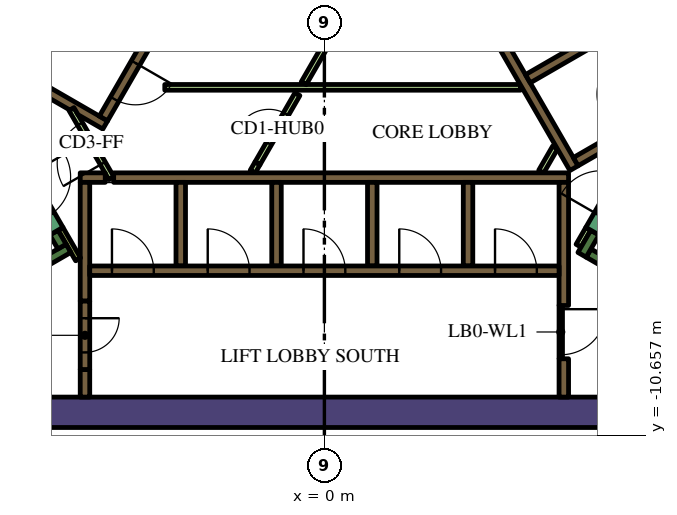
"""IFC4 building model, lengths in metres.
Left out: names, types, materials, properties, quantities, classifications, styles, units other than length and angle.
Written with IfcOpenShell. Run it as: python <this file> out.ifc"""

import sys

from ifc_helpers import new_model, si_unit, direction, frame, frame_2d, origin, place, context, subcontext, project, spatial, polyline, rectangle, outline, extrude, element, fill, save


model = new_model("IFC4")
c1 = context("Model", 3, precision=1e-05, world=origin(), true_north=direction((0.0, 1.0)))
c2 = subcontext(c1, "Body", "Model", "MODEL_VIEW")
j1 = project(units=[si_unit("LENGTHUNIT", "METRE"), si_unit("PLANEANGLEUNIT", "RADIAN")], contexts=[c1])
p1 = place(None, origin())
s1 = spatial("IfcSite", under=j1, at=p1, CompositionType="ELEMENT")
p2 = place(p1, origin())
s2 = spatial("IfcBuilding", under=s1, at=p2, CompositionType="ELEMENT")
p3 = place(p2, frame((0.0, 0.0, 175.2)))
s3 = spatial("IfcBuildingStorey", under=s2, at=p3, CompositionType="ELEMENT", Elevation=175.2)
p4 = place(p3, frame((-13.378, -10.05, 0.0), z_axis=(0.0, 0.0, 1.0), x_axis=(1.0, 0.0, 0.0)))
e1 = element("IfcWall", 1, at=p4, inside=s3, PredefinedType="SOLIDWALL", context=c2, shape_type="SweptSolid", body=[
    extrude(rectangle(XDim=22.282, YDim=0.8, at=frame_2d((11.141, 0.0))), origin(), (0.0, 0.0, 1.0), 4.2),
])
p5 = place(p3, frame((-12.668, -1.842, 0.0), z_axis=(0.0, 0.0, 1.0), x_axis=(0.500003640647, 0.866023301845, 0.0)))
e2 = element("IfcWall", 2, at=p5, inside=s3, PredefinedType="SOLIDWALL", context=c2, shape_type="SweptSolid", body=[
    extrude(rectangle(XDim=15.858, YDim=0.8, at=frame_2d((7.929, 0.0))), origin(), (0.0, 0.0, 1.0), 4.2),
])
p6 = place(p3, frame((12.84, -9.261, 0.0), z_axis=(0.0, 0.0, 1.0), x_axis=(-0.866013990052, 0.500019768644, 0.0)))
e3 = element("IfcWall", 3, at=p6, inside=s3, PredefinedType="SOLIDWALL", context=c2, shape_type="SweptSolid", body=[
    extrude(rectangle(XDim=6.8, YDim=0.25, at=frame_2d((3.4, 0.0))), origin(), (0.0, 0.0, 1.0), 4.2),
])
p7 = place(p3, frame((6.78, -5.906, 0.0), z_axis=(0.0, 0.0, 1.0), x_axis=(0.500223362819, 0.865896406789, 0.0)))
e4 = element("IfcWall", 4, at=p7, inside=s3, PredefinedType="SOLIDWALL", context=c2, shape_type="SweptSolid", body=[
    extrude(rectangle(XDim=0.675, YDim=0.25, at=frame_2d((0.337, 0.0))), origin(), (0.0, 0.0, 1.0), 4.2),
])
p8 = place(p3, frame((-12.84, -9.261, 0.0), z_axis=(0.0, 0.0, 1.0), x_axis=(0.866016039709, 0.500016218704, 0.0)))
e5 = element("IfcWall", 5, at=p8, inside=s3, PredefinedType="SOLIDWALL", context=c2, shape_type="SweptSolid", body=[
    extrude(rectangle(XDim=7.05, YDim=0.25, at=frame_2d((3.525, 0.0))), origin(), (0.0, 0.0, 1.0), 4.2),
])
p9 = place(p3, frame((-6.905, -5.69, 0.0), z_axis=(0.0, 0.0, 1.0), x_axis=(-0.500402024738, 0.865793170242, 0.0)))
e6 = element("IfcWall", 6, at=p9, inside=s3, PredefinedType="SOLIDWALL", context=c2, shape_type="SweptSolid", body=[
    extrude(rectangle(XDim=0.425, YDim=0.25, at=frame_2d((0.212, 0.0))), origin(), (0.0, 0.0, 1.0), 4.2),
])
p10 = place(p3, frame((-6.3, -8.925, 0.0), z_axis=(0.0, 0.0, 1.0), x_axis=(0.0, -1.0, 0.0)))
e7 = element("IfcWall", 7, at=p10, inside=s3, PredefinedType="SOLIDWALL", context=c2, shape_type="SweptSolid", body=[
    extrude(rectangle(XDim=0.725, YDim=0.25, at=frame_2d((0.363, 0.0))), origin(), (0.0, 0.0, 1.0), 4.2),
])
p11 = place(p3, frame((-5.545, -3.875, 0.0), z_axis=(0.0, 0.0, 1.0), x_axis=(1.0, 0.0, 0.0)))
e8 = element("IfcWall", 8, at=p11, inside=s3, PredefinedType="SOLIDWALL", context=c2, shape_type="SweptSolid", body=[
    extrude(rectangle(XDim=11.97, YDim=0.25, at=frame_2d((5.985, 0.0))), origin(), (0.0, 0.0, 1.0), 4.2),
])
p12 = place(p3, frame((-6.425, -3.875, 0.0), z_axis=(0.0, 0.0, 1.0), x_axis=(1.0, 0.0, 0.0)))
e9 = element("IfcWall", 9, at=p12, inside=s3, PredefinedType="SOLIDWALL", context=c2, shape_type="SweptSolid", body=[
    extrude(rectangle(XDim=0.658, YDim=0.25, at=frame_2d((0.329, 0.0))), origin(), (0.0, 0.0, 1.0), 4.2),
])
p13 = place(p3, frame((6.3, -7.24, 0.0), z_axis=(0.0, 0.0, 1.0), x_axis=(0.0, 1.0, 0.0)))
e10 = element("IfcWall", 10, at=p13, inside=s3, PredefinedType="SOLIDWALL", context=c2, shape_type="SweptSolid", body=[
    extrude(rectangle(XDim=3.24, YDim=0.25, at=frame_2d((1.62, 0.0))), origin(), (0.0, 0.0, 1.0), 4.2),
])
p14 = place(p3, frame((6.3, -9.65, 0.0), z_axis=(0.0, 0.0, 1.0), x_axis=(0.0, 1.0, 0.0)))
e11 = element("IfcWall", 11, at=p14, inside=s3, PredefinedType="SOLIDWALL", context=c2, shape_type="SweptSolid", body=[
    extrude(rectangle(XDim=1.008, YDim=0.25, at=frame_2d((0.504, 0.0))), origin(), (0.0, 0.0, 1.0), 4.2),
])
for number, where, z_axis, x_axis in (
    (12, (3.78, -4.0, 0.0), (0.0, 0.0, 1.0), (0.0, -1.0, 0.0)),
    (13, (1.26, -4.0, 0.0), (0.0, 0.0, 1.0), (0.0, -1.0, 0.0)),
    (14, (-1.26, -4.0, 0.0), (0.0, 0.0, 1.0), (0.0, -1.0, 0.0)),
    (15, (-3.78, -4.0, 0.0), (0.0, 0.0, 1.0), (0.0, -1.0, 0.0)),
):
    element("IfcWall", number, at=place(p3, frame(where, z_axis=z_axis, x_axis=x_axis)), inside=s3, PredefinedType="SOLIDWALL", context=c2, shape_type="SweptSolid", body=[
        extrude(rectangle(XDim=2.2, YDim=0.25, at=frame_2d((1.1, 0.0))), origin(), (0.0, 0.0, 1.0), 4.2),
    ])
p15 = place(p3, frame((-6.3, -7.125, 0.0), z_axis=(0.0, 0.0, 1.0), x_axis=(0.0, 1.0, 0.0)))
e16 = element("IfcWall", 16, at=p15, inside=s3, PredefinedType="SOLIDWALL", context=c2, shape_type="SweptSolid", body=[
    extrude(rectangle(XDim=3.125, YDim=0.25, at=frame_2d((1.562, 0.0))), origin(), (0.0, 0.0, 1.0), 4.2),
])
p16 = place(p3, frame((6.568, -3.627, 0.0), z_axis=(0.0, 0.0, 1.0), x_axis=(-0.499999455981, 0.866025717874, 0.0)))
e17 = element("IfcWall", 17, at=p16, inside=s3, PredefinedType="SOLIDWALL", context=c2, shape_type="SweptSolid", body=[
    extrude(rectangle(XDim=11.978, YDim=0.25, at=frame_2d((5.989, 0.0))), origin(), (0.0, 0.0, 1.0), 4.2),
])
p17 = place(p3, frame((5.354, -1.274, 0.0), z_axis=(0.0, 0.0, 1.0), x_axis=(0.866008176907, 0.50002983664, 0.0)))
e18 = element("IfcWall", 18, at=p17, inside=s3, PredefinedType="SOLIDWALL", context=c2, shape_type="SweptSolid", body=[
    extrude(rectangle(XDim=2.2, YDim=0.25, at=frame_2d((1.1, 0.0))), origin(), (0.0, 0.0, 1.0), 4.2),
])
p18 = place(p3, frame((6.614, -3.456, 0.0), z_axis=(0.0, 0.0, 1.0), x_axis=(0.866025089694, 0.500000544019, 0.0)))
e19 = element("IfcWall", 19, at=p18, inside=s3, PredefinedType="SOLIDWALL", context=c2, shape_type="SweptSolid", body=[
    extrude(rectangle(XDim=2.305, YDim=0.25, at=frame_2d((1.153, 0.0))), origin(), (0.0, 0.0, 1.0), 4.2),
])
p19 = place(p3, frame((-8.06, -1.311, 0.0), z_axis=(0.0, 0.0, 1.0), x_axis=(0.50000273126, 0.866023826885, 0.0)))
e20 = element("IfcWall", 20, at=p19, inside=s3, PredefinedType="SOLIDWALL", context=c2, shape_type="SweptSolid", body=[
    extrude(rectangle(XDim=10.33, YDim=0.25, at=frame_2d((5.165, 0.0))), origin(), (0.0, 0.0, 1.0), 4.2),
])
p20 = place(p3, origin())
e21 = element("IfcWall", 21, at=p20, inside=s3, PredefinedType="SOLIDWALL", context=c2, shape_type="SweptSolid", body=[
    extrude(outline(polyline([(-5.922, -2.257), (-5.922, -2.257), (-5.705, -2.382), (-5.83, -2.598), (-6.483, -2.221), (-6.591, -2.033), (-6.591, -2.033), (-6.7, -2.096), (-7.952, -1.373), (-7.827, -1.156), (-5.922, -2.257)])), origin(), (0.0, 0.0, 1.0), 4.2),
])
p21 = place(p3, frame((-6.48, -6.027, 0.0), z_axis=(0.0, 0.0, 1.0), x_axis=(-0.499927229454, 0.866067413802, 0.0)))
e22 = element("IfcWall", 22, at=p21, inside=s3, PredefinedType="PARTITIONING", context=c2, shape_type="SweptSolid", body=[
    extrude(rectangle(XDim=0.929, YDim=0.15, at=frame_2d((0.464, 0.0))), origin(), (0.0, 0.0, 1.0), 4.2),
])
p22 = place(p3, frame((6.945, -5.222, 0.0), z_axis=(0.0, 0.0, 1.0), x_axis=(-0.499818422106, -0.866130212453, 0.0)))
e23 = element("IfcWall", 23, at=p22, inside=s3, PredefinedType="PARTITIONING", context=c2, shape_type="SweptSolid", body=[
    extrude(rectangle(XDim=0.514, YDim=0.15, at=frame_2d((0.257, 0.0))), origin(), (0.0, 0.0, 1.0), 3.15),
])
p23 = place(p3, frame((5.705, -3.718, 0.0), z_axis=(0.0, 0.0, 1.0), x_axis=(0.499962090823, 0.866047289552, 0.0)))
e24 = element("IfcWall", 24, at=p23, inside=s3, PredefinedType="PARTITIONING", context=c2, shape_type="SweptSolid", body=[
    extrude(rectangle(XDim=0.735, YDim=0.15, at=frame_2d((0.367, 0.0))), origin(), (0.0, 0.0, 1.0), 3.15),
])
p24 = place(p3, frame((-4.2, -1.5, 0.0), z_axis=(0.0, 0.0, 1.0), x_axis=(1.0, 0.0, 0.0)))
e25 = element("IfcWall", 25, at=p24, inside=s3, PredefinedType="PARTITIONING", context=c2, shape_type="SweptSolid", body=[
    extrude(rectangle(XDim=9.359, YDim=0.15, at=frame_2d((4.68, 0.0))), origin(), (0.0, 0.0, 1.0), 3.15),
])
p25 = place(p3, frame((-0.544, -1.393, 0.0), z_axis=(0.0, 0.0, 1.0), x_axis=(0.499928740635, 0.866066541489, 0.0)))
e26 = element("IfcWall", 26, at=p25, inside=s3, PredefinedType="PARTITIONING", context=c2, shape_type="SweptSolid", body=[
    extrude(rectangle(XDim=1.912, YDim=0.15, at=frame_2d((0.956, 0.0))), origin(), (0.0, 0.0, 1.0), 3.15),
])
p26 = place(p3, frame((-1.887, -3.718, 0.0), z_axis=(0.0, 0.0, 1.0), x_axis=(0.500165633897, 0.865929753888, 0.0)))
e27 = element("IfcWall", 27, at=p26, inside=s3, PredefinedType="PARTITIONING", context=c2, shape_type="SweptSolid", body=[
    extrude(rectangle(XDim=0.254, YDim=0.15, at=frame_2d((0.127, 0.0))), origin(), (0.0, 0.0, 1.0), 3.15),
])
p27 = place(p3, frame((-6.175, -6.325, 0.0), z_axis=(0.0, 0.0, 1.0), x_axis=(1.0, 0.0, 0.0)))
e28 = element("IfcWall", 28, at=p27, inside=s3, PredefinedType="SOLIDWALL", context=c2, shape_type="SweptSolid", body=[
    extrude(rectangle(XDim=12.35, YDim=0.25, at=frame_2d((6.175, 0.0))), origin(), (0.0, 0.0, 1.0), 4.2),
])
p28 = place(p27, frame((0.585, 0.0, 0.0)))
e29 = element("IfcOpeningElement", 29, at=p28, cuts=e28, PredefinedType="OPENING", context=c2, shape_type="SweptSolid", body=[
    extrude(rectangle(XDim=1.1, YDim=2.1, at=frame_2d((0.55, 1.05))), frame((0.0, 0.135, 0.0), z_axis=(0.0, -1.0, 0.0), x_axis=(1.0, 0.0, 0.0)), (0.0, 0.0, 1.0), 0.27),
])
p29 = place(p27, frame((3.105, 0.0, 0.0)))
e30 = element("IfcOpeningElement", 30, at=p29, cuts=e28, PredefinedType="OPENING", context=c2, shape_type="SweptSolid", body=[
    extrude(rectangle(XDim=1.1, YDim=2.1, at=frame_2d((0.55, 1.05))), frame((0.0, 0.135, 0.0), z_axis=(0.0, -1.0, 0.0), x_axis=(1.0, 0.0, 0.0)), (0.0, 0.0, 1.0), 0.27),
])
p30 = place(p27, frame((5.625, 0.0, 0.0)))
e31 = element("IfcOpeningElement", 31, at=p30, cuts=e28, PredefinedType="OPENING", context=c2, shape_type="SweptSolid", body=[
    extrude(rectangle(XDim=1.1, YDim=2.1, at=frame_2d((0.55, 1.05))), frame((0.0, 0.135, 0.0), z_axis=(0.0, -1.0, 0.0), x_axis=(1.0, 0.0, 0.0)), (0.0, 0.0, 1.0), 0.27),
])
p31 = place(p27, frame((8.145, 0.0, 0.0)))
e32 = element("IfcOpeningElement", 32, at=p31, cuts=e28, PredefinedType="OPENING", context=c2, shape_type="SweptSolid", body=[
    extrude(rectangle(XDim=1.1, YDim=2.1, at=frame_2d((0.55, 1.05))), frame((0.0, 0.135, 0.0), z_axis=(0.0, -1.0, 0.0), x_axis=(1.0, 0.0, 0.0)), (0.0, 0.0, 1.0), 0.27),
])
p32 = place(p27, frame((10.665, 0.0, 0.0)))
e33 = element("IfcOpeningElement", 33, at=p32, cuts=e28, PredefinedType="OPENING", context=c2, shape_type="SweptSolid", body=[
    extrude(rectangle(XDim=1.1, YDim=2.1, at=frame_2d((0.55, 1.05))), frame((0.0, 0.135, 0.0), z_axis=(0.0, -1.0, 0.0), x_axis=(1.0, 0.0, 0.0)), (0.0, 0.0, 1.0), 0.27),
])
p33 = place(p3, frame((8.565, -2.185, 0.0), z_axis=(0.0, 0.0, 1.0), x_axis=(-0.499997954832, 0.866026584559, 0.0)))
e34 = element("IfcWall", 34, at=p33, inside=s3, PredefinedType="SOLIDWALL", context=c2, shape_type="SweptSolid", body=[
    extrude(rectangle(XDim=12.35, YDim=0.25, at=frame_2d((6.175, 0.0))), origin(), (0.0, 0.0, 1.0), 4.2),
])
p34 = place(p33, frame((0.585, 0.0, 0.0)))
e35 = element("IfcOpeningElement", 35, at=p34, cuts=e34, PredefinedType="OPENING", context=c2, shape_type="SweptSolid", body=[
    extrude(rectangle(XDim=1.1, YDim=2.1, at=frame_2d((0.55, 1.05))), frame((0.0, 0.135, 0.0), z_axis=(0.0, -1.0, 0.0), x_axis=(1.0, 0.0, 0.0)), (0.0, 0.0, 1.0), 0.27),
])
p35 = place(p3, frame((-0.898, 6.194, 0.0), z_axis=(0.0, 0.0, 1.0), x_axis=(-0.499996202215, -0.866027596426, 0.0)))
e36 = element("IfcWall", 36, at=p35, inside=s3, PredefinedType="SOLIDWALL", context=c2, shape_type="SweptSolid", body=[
    extrude(rectangle(XDim=9.83, YDim=0.25, at=frame_2d((4.915, 0.0))), origin(), (0.0, 0.0, 1.0), 4.2),
])
p36 = place(p35, frame((0.585, 0.0, 0.0)))
e37 = element("IfcOpeningElement", 37, at=p36, cuts=e36, PredefinedType="OPENING", context=c2, shape_type="SweptSolid", body=[
    extrude(rectangle(XDim=1.1, YDim=2.1, at=frame_2d((0.55, 1.05))), frame((0.0, 0.135, 0.0), z_axis=(0.0, -1.0, 0.0), x_axis=(1.0, 0.0, 0.0)), (0.0, 0.0, 1.0), 0.27),
])
p37 = place(p35, frame((3.105, 0.0, 0.0)))
e38 = element("IfcOpeningElement", 38, at=p37, cuts=e36, PredefinedType="OPENING", context=c2, shape_type="SweptSolid", body=[
    extrude(rectangle(XDim=1.1, YDim=2.1, at=frame_2d((0.55, 1.05))), frame((0.0, 0.135, 0.0), z_axis=(0.0, -1.0, 0.0), x_axis=(1.0, 0.0, 0.0)), (0.0, 0.0, 1.0), 0.27),
])
p38 = place(p35, frame((5.625, 0.0, 0.0)))
e39 = element("IfcOpeningElement", 39, at=p38, cuts=e36, PredefinedType="OPENING", context=c2, shape_type="SweptSolid", body=[
    extrude(rectangle(XDim=1.1, YDim=2.1, at=frame_2d((0.55, 1.05))), frame((0.0, 0.135, 0.0), z_axis=(0.0, -1.0, 0.0), x_axis=(1.0, 0.0, 0.0)), (0.0, 0.0, 1.0), 0.27),
])
p39 = place(p35, frame((8.145, 0.0, 0.0)))
e40 = element("IfcOpeningElement", 40, at=p39, cuts=e36, PredefinedType="OPENING", context=c2, shape_type="SweptSolid", body=[
    extrude(rectangle(XDim=1.1, YDim=2.1, at=frame_2d((0.55, 1.05))), frame((0.0, 0.135, 0.0), z_axis=(0.0, -1.0, 0.0), x_axis=(1.0, 0.0, 0.0)), (0.0, 0.0, 1.0), 0.27),
])
p40 = place(p3, frame((7.053, -5.284, 0.0), z_axis=(0.0, 0.0, 1.0), x_axis=(0.500078061341, 0.865980330357, 0.0)))
e41 = element("IfcWall", 41, at=p40, inside=s3, PredefinedType="SOLIDWALL", context=c2, shape_type="SweptSolid", body=[
    extrude(rectangle(XDim=2.1, YDim=0.4, at=frame_2d((1.05, 0.0))), origin(), (0.0, 0.0, 1.0), 4.2),
])
p41 = place(p40, frame((0.45, 0.0, 0.0)))
e42 = element("IfcOpeningElement", 42, at=p41, cuts=e41, PredefinedType="OPENING", context=c2, shape_type="SweptSolid", body=[
    extrude(rectangle(XDim=1.2, YDim=2.1, at=frame_2d((0.6, 1.05))), frame((0.0, 0.21, 0.0), z_axis=(0.0, -1.0, 0.0), x_axis=(1.0, 0.0, 0.0)), (0.0, 0.0, 1.0), 0.42),
])
p42 = place(p3, frame((-8.103, -3.466, 0.0), z_axis=(0.0, 0.0, 1.0), x_axis=(0.500078061341, -0.865980330357, 0.0)))
e43 = element("IfcWall", 43, at=p42, inside=s3, PredefinedType="SOLIDWALL", context=c2, shape_type="SweptSolid", body=[
    extrude(rectangle(XDim=2.1, YDim=0.4, at=frame_2d((1.05, 0.0))), origin(), (0.0, 0.0, 1.0), 4.2),
])
p43 = place(p42, frame((0.45, 0.0, 0.0)))
e44 = element("IfcOpeningElement", 44, at=p43, cuts=e43, PredefinedType="OPENING", context=c2, shape_type="SweptSolid", body=[
    extrude(rectangle(XDim=1.2, YDim=2.1, at=frame_2d((0.6, 1.05))), frame((0.0, 0.21, 0.0), z_axis=(0.0, -1.0, 0.0), x_axis=(1.0, 0.0, 0.0)), (0.0, 0.0, 1.0), 0.42),
])
p44 = place(p3, frame((-6.3, -7.125, 0.0), z_axis=(0.0, 0.0, 1.0), x_axis=(0.0, -1.0, 0.0)))
e45 = element("IfcWall", 45, at=p44, inside=s3, PredefinedType="SOLIDWALL", context=c2, shape_type="SweptSolid", body=[
    extrude(rectangle(XDim=1.8, YDim=0.25, at=frame_2d((0.9, 0.0))), origin(), (0.0, 0.0, 1.0), 4.2),
])
p45 = place(p44, frame((0.45, 0.0, 0.0)))
e46 = element("IfcOpeningElement", 46, at=p45, cuts=e45, PredefinedType="OPENING", context=c2, shape_type="SweptSolid", body=[
    extrude(rectangle(XDim=0.9, YDim=2.1, at=frame_2d((0.45, 1.05))), frame((0.0, 0.135, 0.0), z_axis=(0.0, -1.0, 0.0), x_axis=(1.0, 0.0, 0.0)), (0.0, 0.0, 1.0), 0.27),
])
p46 = place(p3, frame((-1.76, -3.498, 0.0), z_axis=(0.0, 0.0, 1.0), x_axis=(0.499977374825, 0.866038466041, 0.0)))
e47 = element("IfcWall", 47, at=p46, inside=s3, PredefinedType="PARTITIONING", context=c2, shape_type="SweptSolid", body=[
    extrude(rectangle(XDim=2.1, YDim=0.15, at=frame_2d((1.05, 0.0))), origin(), (0.0, 0.0, 1.0), 3.15),
])
p47 = place(p46, frame((0.6, 0.0, 0.0)))
e48 = element("IfcOpeningElement", 48, at=p47, cuts=e47, PredefinedType="OPENING", context=c2, shape_type="SweptSolid", body=[
    extrude(rectangle(XDim=0.9, YDim=2.1, at=frame_2d((0.45, 1.05))), frame((0.0, 0.085, 0.0), z_axis=(0.0, -1.0, 0.0), x_axis=(1.0, 0.0, 0.0)), (0.0, 0.0, 1.0), 0.17),
])
p48 = place(p3, frame((-5.606, -3.89, 0.0), z_axis=(0.0, 0.0, 1.0), x_axis=(-0.500027713859, 0.866009402589, 0.0)))
e49 = element("IfcWall", 49, at=p48, inside=s3, PredefinedType="PARTITIONING", context=c2, shape_type="SweptSolid", body=[
    extrude(rectangle(XDim=2.1, YDim=0.15, at=frame_2d((1.05, 0.0))), origin(), (0.0, 0.0, 1.0), 3.15),
])
p49 = place(p48, frame((0.45, 0.0, 0.0)))
e50 = element("IfcOpeningElement", 50, at=p49, cuts=e49, PredefinedType="OPENING", context=c2, shape_type="SweptSolid", body=[
    extrude(rectangle(XDim=1.2, YDim=2.1, at=frame_2d((0.6, 1.05))), frame((0.0, 0.085, 0.0), z_axis=(0.0, -1.0, 0.0), x_axis=(1.0, 0.0, 0.0)), (0.0, 0.0, 1.0), 0.17),
])
p50 = place(p3, frame((6.22, -7.237, 0.0), z_axis=(0.0, 0.0, 1.0), x_axis=(0.0, -1.0, 0.0)))
e51 = element("IfcWall", 51, at=p50, inside=s3, PredefinedType="PARTITIONING", context=c2, shape_type="SweptSolid", body=[
    extrude(rectangle(XDim=1.4, YDim=0.09, at=frame_2d((0.7, 0.0))), origin(), (0.0, 0.0, 1.0), 3.15),
])
p51 = place(p50, frame((0.1, 0.0, 0.0)))
e52 = element("IfcOpeningElement", 52, at=p51, cuts=e51, PredefinedType="OPENING", context=c2, shape_type="SweptSolid", body=[
    extrude(rectangle(XDim=1.2, YDim=2.1, at=frame_2d((0.6, 1.05))), frame((0.0, 0.055, 0.0), z_axis=(0.0, -1.0, 0.0), x_axis=(1.0, 0.0, 0.0)), (0.0, 0.0, 1.0), 0.11),
])
p52 = place(p28, origin())
e53 = element("IfcDoor", 53, at=p52, inside=s3, OperationType="DOUBLE_DOOR_SLIDING", PredefinedType="DOOR", context=c2, shape_type="SweptSolid", body=[
    extrude(rectangle(XDim=1.1, YDim=2.1, at=frame_2d((0.55, 1.05))), frame((0.0, 0.025, 0.0), z_axis=(0.0, -1.0, 0.0), x_axis=(1.0, 0.0, 0.0)), (0.0, 0.0, 1.0), 0.05),
])
fill(e29, e53)
p53 = place(p29, origin())
e54 = element("IfcDoor", 54, at=p53, inside=s3, OperationType="DOUBLE_DOOR_SLIDING", PredefinedType="DOOR", context=c2, shape_type="SweptSolid", body=[
    extrude(rectangle(XDim=1.1, YDim=2.1, at=frame_2d((0.55, 1.05))), frame((0.0, 0.025, 0.0), z_axis=(0.0, -1.0, 0.0), x_axis=(1.0, 0.0, 0.0)), (0.0, 0.0, 1.0), 0.05),
])
fill(e30, e54)
p54 = place(p30, origin())
e55 = element("IfcDoor", 55, at=p54, inside=s3, OperationType="DOUBLE_DOOR_SLIDING", PredefinedType="DOOR", context=c2, shape_type="SweptSolid", body=[
    extrude(rectangle(XDim=1.1, YDim=2.1, at=frame_2d((0.55, 1.05))), frame((0.0, 0.025, 0.0), z_axis=(0.0, -1.0, 0.0), x_axis=(1.0, 0.0, 0.0)), (0.0, 0.0, 1.0), 0.05),
])
fill(e31, e55)
p55 = place(p31, origin())
e56 = element("IfcDoor", 56, at=p55, inside=s3, OperationType="DOUBLE_DOOR_SLIDING", PredefinedType="DOOR", context=c2, shape_type="SweptSolid", body=[
    extrude(rectangle(XDim=1.1, YDim=2.1, at=frame_2d((0.55, 1.05))), frame((0.0, 0.025, 0.0), z_axis=(0.0, -1.0, 0.0), x_axis=(1.0, 0.0, 0.0)), (0.0, 0.0, 1.0), 0.05),
])
fill(e32, e56)
p56 = place(p32, origin())
e57 = element("IfcDoor", 57, at=p56, inside=s3, OperationType="DOUBLE_DOOR_SLIDING", PredefinedType="DOOR", context=c2, shape_type="SweptSolid", body=[
    extrude(rectangle(XDim=1.1, YDim=2.1, at=frame_2d((0.55, 1.05))), frame((0.0, 0.025, 0.0), z_axis=(0.0, -1.0, 0.0), x_axis=(1.0, 0.0, 0.0)), (0.0, 0.0, 1.0), 0.05),
])
fill(e33, e57)
p57 = place(p39, origin())
e58 = element("IfcDoor", 58, at=p57, inside=s3, OperationType="DOUBLE_DOOR_SLIDING", PredefinedType="DOOR", context=c2, shape_type="SweptSolid", body=[
    extrude(rectangle(XDim=1.1, YDim=2.1, at=frame_2d((0.55, 1.05))), frame((0.0, 0.025, 0.0), z_axis=(0.0, -1.0, 0.0), x_axis=(1.0, 0.0, 0.0)), (0.0, 0.0, 1.0), 0.05),
])
fill(e40, e58)
p58 = place(p45, origin())
e59 = element("IfcDoor", 59, at=p58, inside=s3, OperationType="SINGLE_SWING_LEFT", PredefinedType="DOOR", context=c2, shape_type="SweptSolid", body=[
    extrude(rectangle(XDim=0.9, YDim=2.1, at=frame_2d((0.45, 1.05))), frame((0.0, 0.025, 0.0), z_axis=(0.0, -1.0, 0.0), x_axis=(1.0, 0.0, 0.0)), (0.0, 0.0, 1.0), 0.05),
])
fill(e46, e59)
p59 = place(p47, origin())
e60 = element("IfcDoor", 60, at=p59, inside=s3, OperationType="SINGLE_SWING_LEFT", PredefinedType="DOOR", context=c2, shape_type="SweptSolid", body=[
    extrude(rectangle(XDim=0.9, YDim=2.1, at=frame_2d((0.45, 1.05))), frame((0.0, 0.025, 0.0), z_axis=(0.0, -1.0, 0.0), x_axis=(1.0, 0.0, 0.0)), (0.0, 0.0, 1.0), 0.05),
])
fill(e48, e60)
p60 = place(p49, origin())
e61 = element("IfcDoor", 61, at=p60, inside=s3, OperationType="SINGLE_SWING_LEFT", PredefinedType="DOOR", context=c2, shape_type="SweptSolid", body=[
    extrude(rectangle(XDim=1.2, YDim=2.1, at=frame_2d((0.6, 1.05))), frame((0.0, 0.025, 0.0), z_axis=(0.0, -1.0, 0.0), x_axis=(1.0, 0.0, 0.0)), (0.0, 0.0, 1.0), 0.05),
])
fill(e50, e61)
p61 = place(p51, origin())
e62 = element("IfcDoor", 62, at=p61, inside=s3, OperationType="SINGLE_SWING_LEFT", PredefinedType="DOOR", context=c2, shape_type="SweptSolid", body=[
    extrude(rectangle(XDim=1.2, YDim=2.1, at=frame_2d((0.6, 1.05))), frame((0.0, 0.025, 0.0), z_axis=(0.0, -1.0, 0.0), x_axis=(1.0, 0.0, 0.0)), (0.0, 0.0, 1.0), 0.05),
])
fill(e52, e62)
save(model, sys.argv[1])
